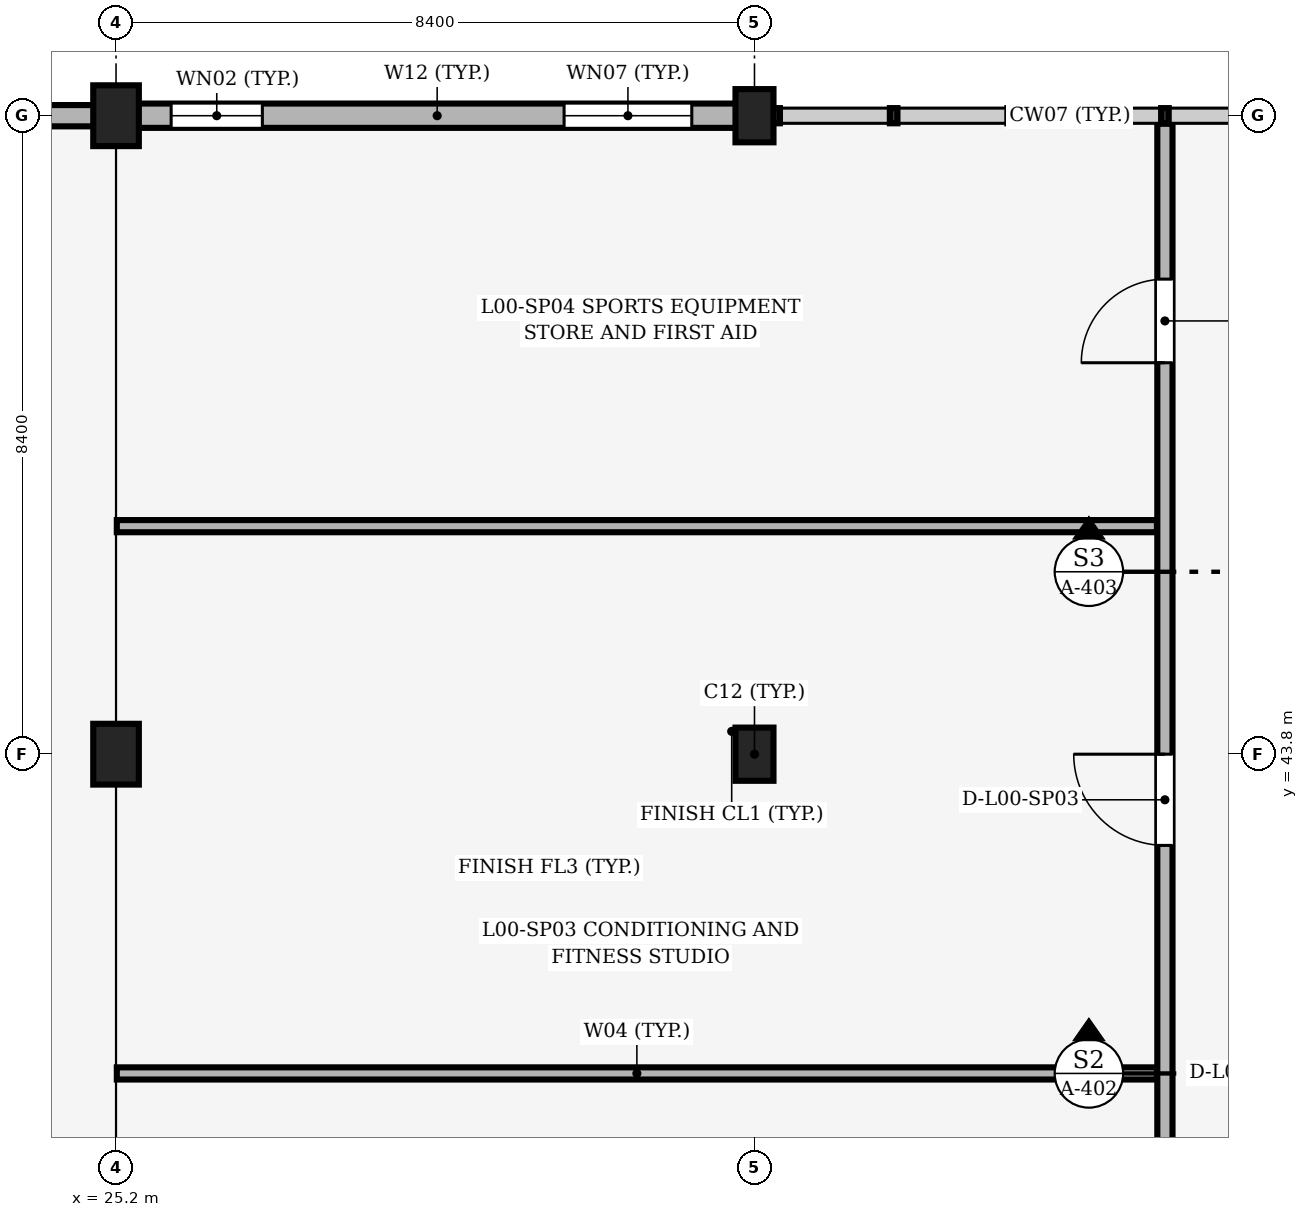
"""IFC4 building model, lengths in metres.
Left out: names, types, materials, properties, quantities, classifications, styles, units other than length and angle.
Written with IfcOpenShell. Run it as: python <this file> out.ifc"""

import sys

from ifc_helpers import new_model, si_unit, direction, frame, frame_2d, origin, origin_2d, place, context, subcontext, project, spatial, rectangle, extrude, element, fill, save


model = new_model("IFC4")
c1 = context("Model", 3, precision=1e-05, world=origin(), true_north=direction((0.0, 1.0)))
c2 = subcontext(c1, "Body", "Model", "MODEL_VIEW")
j1 = project(units=[si_unit("LENGTHUNIT", "METRE"), si_unit("PLANEANGLEUNIT", "RADIAN")], contexts=[c1])
p1 = place(None, origin())
s1 = spatial("IfcSite", under=j1, at=p1, CompositionType="ELEMENT")
p2 = place(p1, origin())
s2 = spatial("IfcBuilding", under=s1, at=p2, CompositionType="ELEMENT")
p3 = place(p2, origin())
s3 = spatial("IfcBuildingStorey", under=s2, at=p3, CompositionType="ELEMENT", Elevation=0.0)
for number, where, z_axis, x_axis in (
    (1, (25.2, 43.8, 0.0), (0.0, 0.0, 1.0), (1.0, 0.0, 0.0)),
    (2, (25.2, 52.2, 0.0), (0.0, 0.0, 1.0), (1.0, 0.0, 0.0)),
):
    element("IfcColumn", number, at=place(p3, frame(where, z_axis=z_axis, x_axis=x_axis)), inside=s3, PredefinedType="COLUMN", context=c2, shape_type="SweptSolid", body=[
        extrude(rectangle(XDim=0.6, YDim=0.8, at=origin_2d()), origin(), (0.0, 0.0, 1.0), 4.8),
    ])
for number, where, z_axis, x_axis in (
    (3, (33.6, 43.8, 0.0), (0.0, 0.0, 1.0), (1.0, 0.0, 0.0)),
    (4, (33.6, 52.2, 0.0), (0.0, 0.0, 1.0), (1.0, 0.0, 0.0)),
):
    element("IfcColumn", number, at=place(p3, frame(where, z_axis=z_axis, x_axis=x_axis)), inside=s3, PredefinedType="COLUMN", context=c2, shape_type="SweptSolid", body=[
        extrude(rectangle(XDim=0.5, YDim=0.7, at=origin_2d()), origin(), (0.0, 0.0, 1.0), 4.8),
    ])
p4 = place(p3, frame((25.475, 52.2, 0.0), z_axis=(0.0, 0.0, 1.0), x_axis=(1.0, 0.0, 0.0)))
e5 = element("IfcWall", 5, at=p4, inside=s3, PredefinedType="SOLIDWALL", context=c2, shape_type="SweptSolid", body=[
    extrude(rectangle(XDim=7.9, YDim=0.32, at=frame_2d((3.95, 0.0))), origin(), (0.0, 0.0, 1.0), 3.87),
])
p5 = place(p4, frame((0.45, 0.0, 0.9)))
e6 = element("IfcOpeningElement", 6, at=p5, cuts=e5, PredefinedType="OPENING", context=c2, shape_type="SweptSolid", body=[
    extrude(rectangle(XDim=1.2, YDim=1.8, at=frame_2d((0.6, 0.9))), frame((0.0, 0.17, 0.0), z_axis=(0.0, -1.0, 0.0), x_axis=(1.0, 0.0, 0.0)), (0.0, 0.0, 1.0), 0.34),
])
p6 = place(p4, frame((5.62, 0.0, 0.9)))
e7 = element("IfcOpeningElement", 7, at=p6, cuts=e5, PredefinedType="OPENING", context=c2, shape_type="SweptSolid", body=[
    extrude(rectangle(XDim=1.68, YDim=2.4, at=frame_2d((0.84, 1.2))), frame((0.0, 0.17, 0.0), z_axis=(0.0, -1.0, 0.0), x_axis=(1.0, 0.0, 0.0)), (0.0, 0.0, 1.0), 0.34),
])
p7 = place(p3, frame((17.075, 52.2, 0.0), z_axis=(0.0, 0.0, 1.0), x_axis=(1.0, 0.0, 0.0)))
e8 = element("IfcWall", 8, at=p7, inside=s3, PredefinedType="SOLIDWALL", context=c2, shape_type="SweptSolid", body=[
    extrude(rectangle(XDim=7.85, YDim=0.28, at=frame_2d((3.925, 0.0))), origin(), (0.0, 0.0, 1.0), 4.267),
])
p8 = place(p3, frame((25.21, 39.6, 0.0), z_axis=(0.0, 0.0, 1.0), x_axis=(1.0, 0.0, 0.0)))
e9 = element("IfcWall", 9, at=p8, inside=s3, PredefinedType="PARTITIONING", context=c2, shape_type="SweptSolid", body=[
    extrude(rectangle(XDim=13.685, YDim=0.16, at=frame_2d((6.843, 0.0))), origin(), (0.0, 0.0, 1.0), 4.5),
])
p9 = place(p3, frame((25.21, 46.8, 0.0), z_axis=(0.0, 0.0, 1.0), x_axis=(1.0, 0.0, 0.0)))
e10 = element("IfcWall", 10, at=p9, inside=s3, PredefinedType="PARTITIONING", context=c2, shape_type="SweptSolid", body=[
    extrude(rectangle(XDim=13.685, YDim=0.16, at=frame_2d((6.843, 0.0))), origin(), (0.0, 0.0, 1.0), 4.114),
])
p10 = place(p3, frame((39.0, 22.56, 0.0), z_axis=(0.0, 0.0, 1.0), x_axis=(0.0, 1.0, 0.0)))
e11 = element("IfcWall", 11, at=p10, inside=s3, PredefinedType="PARTITIONING", context=c2, shape_type="SweptSolid", body=[
    extrude(rectangle(XDim=29.535, YDim=0.2, at=frame_2d((14.768, 0.0))), origin(), (0.0, 0.0, 1.0), 4.5),
])
p11 = place(p10, frame((3.665, 0.0, 0.0)))
e12 = element("IfcOpeningElement", 12, at=p11, cuts=e11, PredefinedType="OPENING", context=c2, shape_type="SweptSolid", body=[
    extrude(rectangle(XDim=1.1, YDim=2.15, at=frame_2d((0.55, 1.075))), frame((0.0, 0.11, 0.0), z_axis=(0.0, -1.0, 0.0), x_axis=(1.0, 0.0, 0.0)), (0.0, 0.0, 1.0), 0.22),
])
p12 = place(p10, frame((12.19, 0.0, 0.0)))
e13 = element("IfcOpeningElement", 13, at=p12, cuts=e11, PredefinedType="OPENING", context=c2, shape_type="SweptSolid", body=[
    extrude(rectangle(XDim=1.1, YDim=2.15, at=frame_2d((0.55, 1.075))), frame((0.0, 0.11, 0.0), z_axis=(0.0, -1.0, 0.0), x_axis=(1.0, 0.0, 0.0)), (0.0, 0.0, 1.0), 0.22),
])
p13 = place(p10, frame((20.04, 0.0, 0.0)))
e14 = element("IfcOpeningElement", 14, at=p13, cuts=e11, PredefinedType="OPENING", context=c2, shape_type="SweptSolid", body=[
    extrude(rectangle(XDim=1.2, YDim=2.2, at=frame_2d((0.6, 1.1))), frame((0.0, 0.11, 0.0), z_axis=(0.0, -1.0, 0.0), x_axis=(1.0, 0.0, 0.0)), (0.0, 0.0, 1.0), 0.22),
])
p14 = place(p10, frame((26.39, 0.0, 0.0)))
e15 = element("IfcOpeningElement", 15, at=p14, cuts=e11, PredefinedType="OPENING", context=c2, shape_type="SweptSolid", body=[
    extrude(rectangle(XDim=1.1, YDim=2.15, at=frame_2d((0.55, 1.075))), frame((0.0, 0.11, 0.0), z_axis=(0.0, -1.0, 0.0), x_axis=(1.0, 0.0, 0.0)), (0.0, 0.0, 1.0), 0.22),
])
p15 = place(p5, origin())
e16 = element("IfcWindow", 16, at=p15, inside=s3, PartitioningType="SINGLE_PANEL", PredefinedType="WINDOW", context=c2, shape_type="SweptSolid", body=[
    extrude(rectangle(XDim=1.2, YDim=1.8, at=frame_2d((0.6, 0.9))), frame((0.0, 0.03, 0.0), z_axis=(0.0, -1.0, 0.0), x_axis=(1.0, 0.0, 0.0)), (0.0, 0.0, 1.0), 0.06),
])
fill(e6, e16)
p16 = place(p6, origin())
e17 = element("IfcWindow", 17, at=p16, inside=s3, PartitioningType="SINGLE_PANEL", PredefinedType="WINDOW", context=c2, shape_type="SweptSolid", body=[
    extrude(rectangle(XDim=1.68, YDim=2.4, at=frame_2d((0.84, 1.2))), frame((0.0, 0.03, 0.0), z_axis=(0.0, -1.0, 0.0), x_axis=(1.0, 0.0, 0.0)), (0.0, 0.0, 1.0), 0.06),
])
fill(e7, e17)
p17 = place(p13, origin())
e18 = element("IfcDoor", 18, at=p17, inside=s3, OperationType="SINGLE_SWING_RIGHT", PredefinedType="DOOR", context=c2, shape_type="SweptSolid", body=[
    extrude(rectangle(XDim=1.2, YDim=2.2, at=frame_2d((0.6, 1.1))), frame((0.0, 0.025, 0.0), z_axis=(0.0, -1.0, 0.0), x_axis=(1.0, 0.0, 0.0)), (0.0, 0.0, 1.0), 0.05),
])
fill(e14, e18)
p18 = place(p14, origin())
e19 = element("IfcDoor", 19, at=p18, inside=s3, OperationType="SINGLE_SWING_LEFT", PredefinedType="DOOR", context=c2, shape_type="SweptSolid", body=[
    extrude(rectangle(XDim=1.1, YDim=2.15, at=frame_2d((0.55, 1.075))), frame((0.0, 0.025, 0.0), z_axis=(0.0, -1.0, 0.0), x_axis=(1.0, 0.0, 0.0)), (0.0, 0.0, 1.0), 0.05),
])
fill(e15, e19)
save(model, sys.argv[1])
